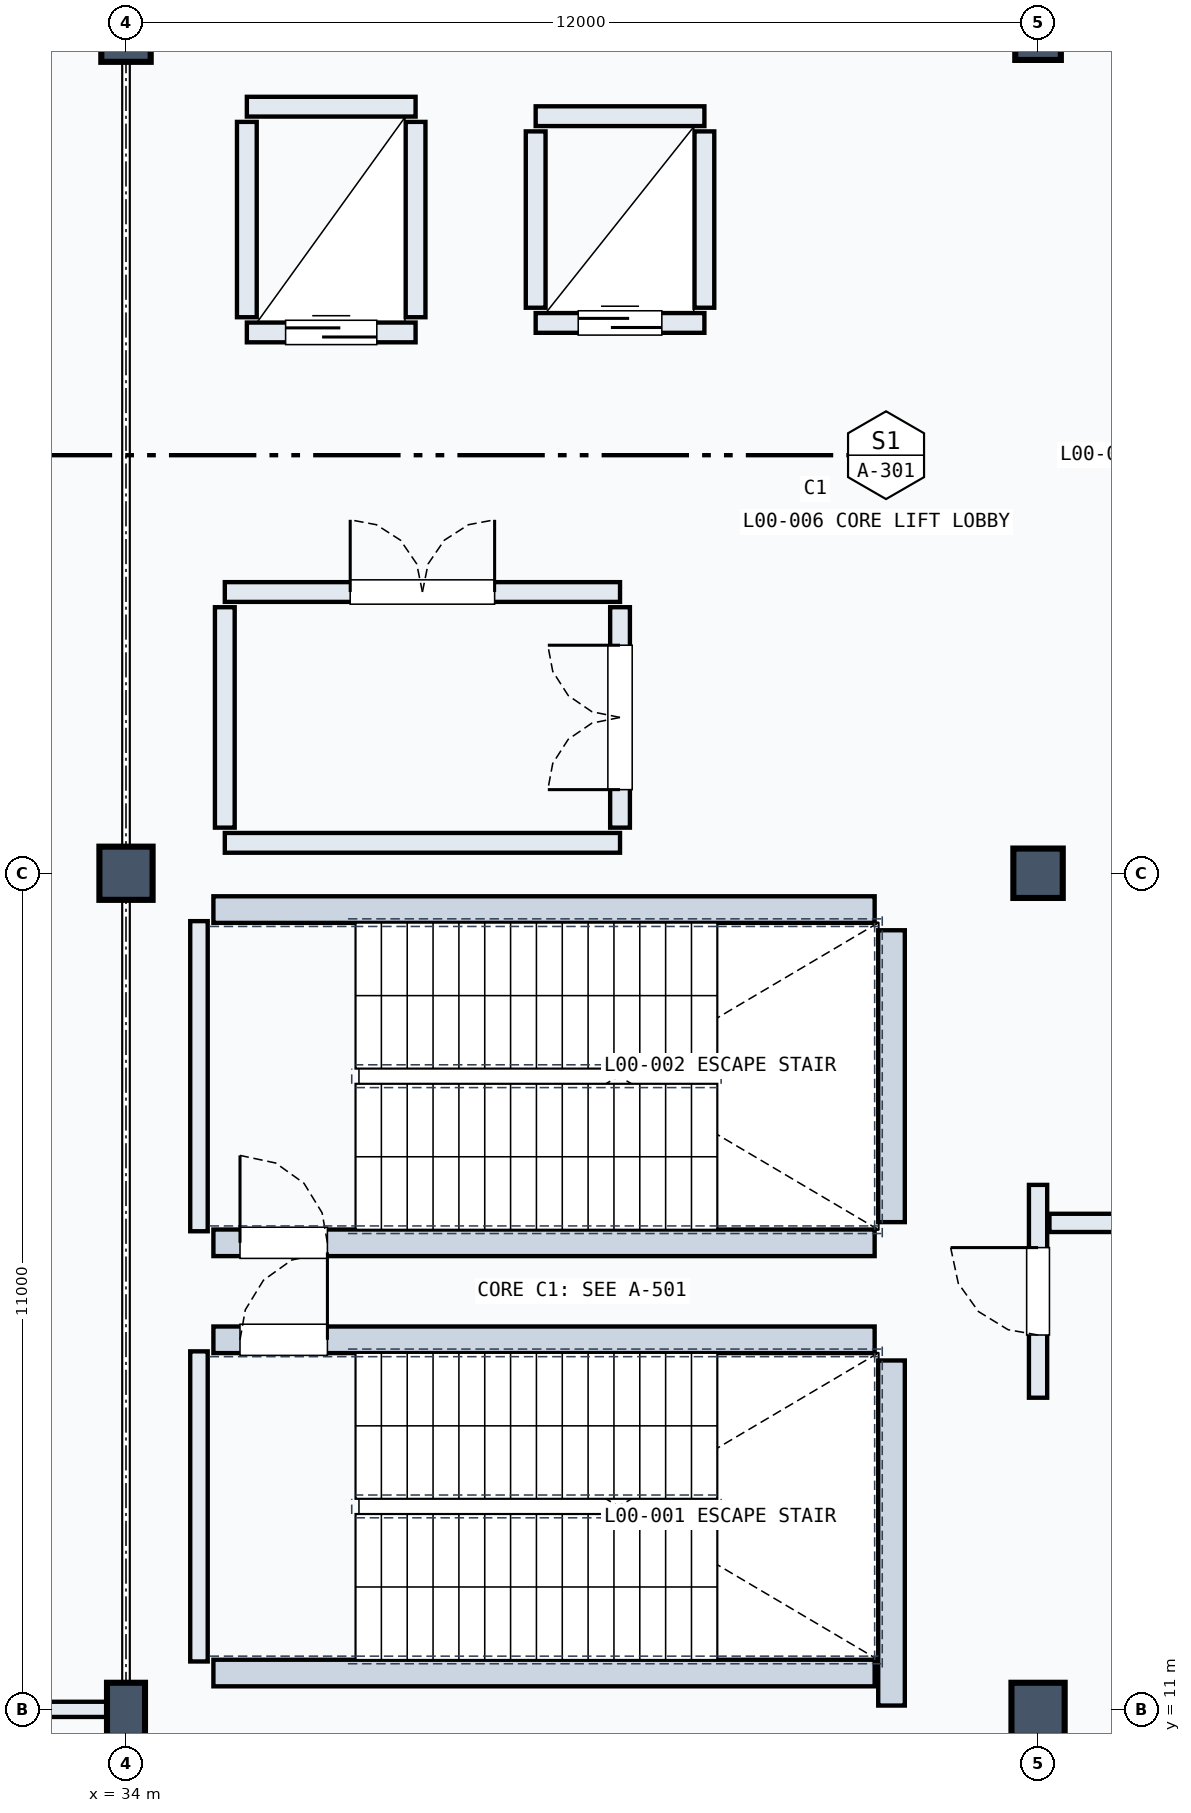
"""IFC4 building model, lengths in metres.
Left out: names, types, materials, properties, quantities, classifications, styles, units other than length and angle.
Written with IfcOpenShell. Run it as: python <this file> out.ifc"""

import sys

from ifc_helpers import new_model, si_unit, direction, frame, frame_2d, origin, origin_2d, place, context, subcontext, project, spatial, rectangle, extrude, element, fill, save


model = new_model("IFC4")
c1 = context("Model", 3, precision=1e-05, world=origin(), true_north=direction((0.0, 1.0)))
c2 = subcontext(c1, "Body", "Model", "MODEL_VIEW")
j1 = project(units=[si_unit("LENGTHUNIT", "METRE"), si_unit("PLANEANGLEUNIT", "RADIAN")], contexts=[c1])
p1 = place(None, origin())
s1 = spatial("IfcSite", under=j1, at=p1, CompositionType="ELEMENT")
p2 = place(p1, origin())
s2 = spatial("IfcBuilding", under=s1, at=p2, CompositionType="ELEMENT")
p3 = place(p2, origin())
s3 = spatial("IfcBuildingStorey", under=s2, at=p3, CompositionType="ELEMENT", Elevation=0.0)
p4 = place(p3, frame((34.0, 11.0, 0.0), z_axis=(0.0, 0.0, 1.0), x_axis=(1.0, 0.0, 0.0)))
e1 = element("IfcColumn", 1, at=p4, inside=s3, PredefinedType="COLUMN", context=c2, shape_type="SweptSolid", body=[
    extrude(rectangle(XDim=0.5, YDim=0.7, at=origin_2d()), origin(), (0.0, 0.0, 1.0), 5.4),
])
p5 = place(p3, frame((34.0, 22.0, 0.0), z_axis=(0.0, 0.0, 1.0), x_axis=(1.0, 0.0, 0.0)))
e2 = element("IfcColumn", 2, at=p5, inside=s3, PredefinedType="COLUMN", context=c2, shape_type="SweptSolid", body=[
    extrude(rectangle(XDim=0.7, YDim=0.7, at=origin_2d()), origin(), (0.0, 0.0, 1.0), 5.4),
])
p6 = place(p3, frame((34.0, 33.0, 0.0), z_axis=(0.0, 0.0, 1.0), x_axis=(1.0, 0.0, 0.0)))
e3 = element("IfcColumn", 3, at=p6, inside=s3, PredefinedType="COLUMN", context=c2, shape_type="SweptSolid", body=[
    extrude(rectangle(XDim=0.65, YDim=0.65, at=origin_2d()), origin(), (0.0, 0.0, 1.0), 5.4),
])
p7 = place(p3, frame((46.0, 11.0, 0.0), z_axis=(0.0, 0.0, 1.0), x_axis=(1.0, 0.0, 0.0)))
e4 = element("IfcColumn", 4, at=p7, inside=s3, PredefinedType="COLUMN", context=c2, shape_type="SweptSolid", body=[
    extrude(rectangle(XDim=0.7, YDim=0.7, at=origin_2d()), origin(), (0.0, 0.0, 1.0), 5.4),
])
p8 = place(p3, frame((46.0, 22.0, 0.0), z_axis=(0.0, 0.0, 1.0), x_axis=(1.0, 0.0, 0.0)))
e5 = element("IfcColumn", 5, at=p8, inside=s3, PredefinedType="COLUMN", context=c2, shape_type="SweptSolid", body=[
    extrude(rectangle(XDim=0.65, YDim=0.65, at=origin_2d()), origin(), (0.0, 0.0, 1.0), 5.4),
])
p9 = place(p3, frame((46.0, 33.0, 0.0), z_axis=(0.0, 0.0, 1.0), x_axis=(1.0, 0.0, 0.0)))
e6 = element("IfcColumn", 6, at=p9, inside=s3, PredefinedType="COLUMN", context=c2, shape_type="SweptSolid", body=[
    extrude(rectangle(XDim=0.6, YDim=0.6, at=origin_2d()), origin(), (0.0, 0.0, 1.0), 5.4),
])
p10 = place(p3, frame((34.96, 11.63, 0.0), z_axis=(0.0, 0.0, 1.0), x_axis=(0.0, 1.0, 0.0)))
e7 = element("IfcWall", 7, at=p10, inside=s3, PredefinedType="SOLIDWALL", context=c2, shape_type="SweptSolid", body=[
    extrude(rectangle(XDim=4.08, YDim=0.23, at=frame_2d((2.04, 0.0))), origin(), (0.0, 0.0, 1.0), 4.45),
])
p11 = place(p3, frame((44.072, 11.05, 0.0), z_axis=(0.0, 0.0, 1.0), x_axis=(0.0, 1.0, 0.0)))
e8 = element("IfcWall", 8, at=p11, inside=s3, PredefinedType="SOLIDWALL", context=c2, shape_type="SweptSolid", body=[
    extrude(rectangle(XDim=4.54, YDim=0.35, at=frame_2d((2.27, 0.0))), origin(), (0.0, 0.0, 1.0), 5.06),
])
p12 = place(p3, frame((35.15, 11.478, 0.0), z_axis=(0.0, 0.0, 1.0), x_axis=(1.0, 0.0, 0.0)))
e9 = element("IfcWall", 9, at=p12, inside=s3, PredefinedType="SOLIDWALL", context=c2, shape_type="SweptSolid", body=[
    extrude(rectangle(XDim=8.7, YDim=0.35, at=frame_2d((4.35, 0.0))), origin(), (0.0, 0.0, 1.0), 5.06),
])
p13 = place(p3, frame((35.15, 15.862, 0.0), z_axis=(0.0, 0.0, 1.0), x_axis=(1.0, 0.0, 0.0)))
e10 = element("IfcWall", 10, at=p13, inside=s3, PredefinedType="SOLIDWALL", context=c2, shape_type="SweptSolid", body=[
    extrude(rectangle(XDim=8.7, YDim=0.35, at=frame_2d((4.35, 0.0))), origin(), (0.0, 0.0, 1.0), 5.06),
])
p14 = place(p13, frame((0.35, 0.0, 0.0)))
e11 = element("IfcOpeningElement", 11, at=p14, cuts=e10, PredefinedType="OPENING", context=c2, shape_type="SweptSolid", body=[
    extrude(rectangle(XDim=1.15, YDim=2.2, at=frame_2d((0.575, 1.1))), frame((0.0, 0.185, 0.0), z_axis=(0.0, -1.0, 0.0), x_axis=(1.0, 0.0, 0.0)), (0.0, 0.0, 1.0), 0.37),
])
p15 = place(p3, frame((34.96, 17.29, 0.0), z_axis=(0.0, 0.0, 1.0), x_axis=(0.0, 1.0, 0.0)))
e12 = element("IfcWall", 12, at=p15, inside=s3, PredefinedType="SOLIDWALL", context=c2, shape_type="SweptSolid", body=[
    extrude(rectangle(XDim=4.08, YDim=0.23, at=frame_2d((2.04, 0.0))), origin(), (0.0, 0.0, 1.0), 4.45),
])
p16 = place(p3, frame((44.072, 17.41, 0.0), z_axis=(0.0, 0.0, 1.0), x_axis=(0.0, 1.0, 0.0)))
e13 = element("IfcWall", 13, at=p16, inside=s3, PredefinedType="SOLIDWALL", context=c2, shape_type="SweptSolid", body=[
    extrude(rectangle(XDim=3.84, YDim=0.35, at=frame_2d((1.92, 0.0))), origin(), (0.0, 0.0, 1.0), 5.06),
])
p17 = place(p3, frame((35.15, 17.138, 0.0), z_axis=(0.0, 0.0, 1.0), x_axis=(1.0, 0.0, 0.0)))
e14 = element("IfcWall", 14, at=p17, inside=s3, PredefinedType="SOLIDWALL", context=c2, shape_type="SweptSolid", body=[
    extrude(rectangle(XDim=8.7, YDim=0.35, at=frame_2d((4.35, 0.0))), origin(), (0.0, 0.0, 1.0), 5.06),
])
p18 = place(p17, frame((0.35, 0.0, 0.0)))
e15 = element("IfcOpeningElement", 15, at=p18, cuts=e14, PredefinedType="OPENING", context=c2, shape_type="SweptSolid", body=[
    extrude(rectangle(XDim=1.15, YDim=2.2, at=frame_2d((0.575, 1.1))), frame((0.0, 0.185, 0.0), z_axis=(0.0, -1.0, 0.0), x_axis=(1.0, 0.0, 0.0)), (0.0, 0.0, 1.0), 0.37),
])
p19 = place(p3, frame((35.15, 21.522, 0.0), z_axis=(0.0, 0.0, 1.0), x_axis=(1.0, 0.0, 0.0)))
e16 = element("IfcWall", 16, at=p19, inside=s3, PredefinedType="SOLIDWALL", context=c2, shape_type="SweptSolid", body=[
    extrude(rectangle(XDim=8.7, YDim=0.35, at=frame_2d((4.35, 0.0))), origin(), (0.0, 0.0, 1.0), 5.06),
])
p20 = place(p3, frame((35.59, 29.115, 0.0), z_axis=(0.0, 0.0, 1.0), x_axis=(1.0, 0.0, 0.0)))
e17 = element("IfcWall", 17, at=p20, inside=s3, PredefinedType="SOLIDWALL", context=c2, shape_type="SweptSolid", body=[
    extrude(rectangle(XDim=2.22, YDim=0.26, at=frame_2d((1.11, 0.0))), origin(), (0.0, 0.0, 1.0), 5.06),
])
p21 = place(p20, frame((0.51, 0.0, 0.0)))
e18 = element("IfcOpeningElement", 18, at=p21, cuts=e17, PredefinedType="OPENING", context=c2, shape_type="SweptSolid", body=[
    extrude(rectangle(XDim=1.2, YDim=2.2, at=frame_2d((0.6, 1.1))), frame((0.0, 0.14, 0.0), z_axis=(0.0, -1.0, 0.0), x_axis=(1.0, 0.0, 0.0)), (0.0, 0.0, 1.0), 0.28),
])
p22 = place(p3, frame((35.59, 32.085, 0.0), z_axis=(0.0, 0.0, 1.0), x_axis=(1.0, 0.0, 0.0)))
e19 = element("IfcWall", 19, at=p22, inside=s3, PredefinedType="SOLIDWALL", context=c2, shape_type="SweptSolid", body=[
    extrude(rectangle(XDim=2.22, YDim=0.26, at=frame_2d((1.11, 0.0))), origin(), (0.0, 0.0, 1.0), 5.06),
])
for number, where, z_axis, x_axis in (
    (20, (35.59, 29.315, 0.0), (0.0, 0.0, 1.0), (0.0, 1.0, 0.0)),
    (21, (37.81, 29.315, 0.0), (0.0, 0.0, 1.0), (0.0, 1.0, 0.0)),
):
    element("IfcWall", number, at=place(p3, frame(where, z_axis=z_axis, x_axis=x_axis)), inside=s3, PredefinedType="SOLIDWALL", context=c2, shape_type="SweptSolid", body=[
        extrude(rectangle(XDim=2.57, YDim=0.26, at=frame_2d((1.285, 0.0))), origin(), (0.0, 0.0, 1.0), 5.06),
    ])
p23 = place(p3, frame((39.39, 29.24, 0.0), z_axis=(0.0, 0.0, 1.0), x_axis=(1.0, 0.0, 0.0)))
e22 = element("IfcWall", 22, at=p23, inside=s3, PredefinedType="SOLIDWALL", context=c2, shape_type="SweptSolid", body=[
    extrude(rectangle(XDim=2.22, YDim=0.26, at=frame_2d((1.11, 0.0))), origin(), (0.0, 0.0, 1.0), 5.06),
])
p24 = place(p23, frame((0.56, 0.0, 0.0)))
e23 = element("IfcOpeningElement", 23, at=p24, cuts=e22, PredefinedType="OPENING", context=c2, shape_type="SweptSolid", body=[
    extrude(rectangle(XDim=1.1, YDim=2.15, at=frame_2d((0.55, 1.075))), frame((0.0, 0.14, 0.0), z_axis=(0.0, -1.0, 0.0), x_axis=(1.0, 0.0, 0.0)), (0.0, 0.0, 1.0), 0.28),
])
p25 = place(p3, frame((39.39, 31.96, 0.0), z_axis=(0.0, 0.0, 1.0), x_axis=(1.0, 0.0, 0.0)))
e24 = element("IfcWall", 24, at=p25, inside=s3, PredefinedType="SOLIDWALL", context=c2, shape_type="SweptSolid", body=[
    extrude(rectangle(XDim=2.22, YDim=0.26, at=frame_2d((1.11, 0.0))), origin(), (0.0, 0.0, 1.0), 5.06),
])
for number, where, z_axis, x_axis in (
    (25, (39.39, 29.44, 0.0), (0.0, 0.0, 1.0), (0.0, 1.0, 0.0)),
    (26, (41.61, 29.44, 0.0), (0.0, 0.0, 1.0), (0.0, 1.0, 0.0)),
):
    element("IfcWall", number, at=place(p3, frame(where, z_axis=z_axis, x_axis=x_axis)), inside=s3, PredefinedType="SOLIDWALL", context=c2, shape_type="SweptSolid", body=[
        extrude(rectangle(XDim=2.32, YDim=0.26, at=frame_2d((1.16, 0.0))), origin(), (0.0, 0.0, 1.0), 5.06),
    ])
p26 = place(p3, frame((35.3, 25.7, 0.0), z_axis=(0.0, 0.0, 1.0), x_axis=(1.0, 0.0, 0.0)))
e27 = element("IfcWall", 27, at=p26, inside=s3, PredefinedType="SOLIDWALL", context=c2, shape_type="SweptSolid", body=[
    extrude(rectangle(XDim=5.2, YDim=0.26, at=frame_2d((2.6, 0.0))), origin(), (0.0, 0.0, 1.0), 5.06),
])
p27 = place(p26, frame((1.65, 0.0, 0.0)))
e28 = element("IfcOpeningElement", 28, at=p27, cuts=e27, PredefinedType="OPENING", context=c2, shape_type="SweptSolid", body=[
    extrude(rectangle(XDim=1.9, YDim=2.2, at=frame_2d((0.95, 1.1))), frame((0.0, 0.14, 0.0), z_axis=(0.0, -1.0, 0.0), x_axis=(1.0, 0.0, 0.0)), (0.0, 0.0, 1.0), 0.28),
])
p28 = place(p3, frame((35.3, 22.4, 0.0), z_axis=(0.0, 0.0, 1.0), x_axis=(1.0, 0.0, 0.0)))
e29 = element("IfcWall", 29, at=p28, inside=s3, PredefinedType="SOLIDWALL", context=c2, shape_type="SweptSolid", body=[
    extrude(rectangle(XDim=5.2, YDim=0.26, at=frame_2d((2.6, 0.0))), origin(), (0.0, 0.0, 1.0), 4.438),
])
p29 = place(p3, frame((35.3, 22.6, 0.0), z_axis=(0.0, 0.0, 1.0), x_axis=(0.0, 1.0, 0.0)))
e30 = element("IfcWall", 30, at=p29, inside=s3, PredefinedType="SOLIDWALL", context=c2, shape_type="SweptSolid", body=[
    extrude(rectangle(XDim=2.9, YDim=0.26, at=frame_2d((1.45, 0.0))), origin(), (0.0, 0.0, 1.0), 5.06),
])
p30 = place(p3, frame((40.5, 22.6, 0.0), z_axis=(0.0, 0.0, 1.0), x_axis=(0.0, 1.0, 0.0)))
e31 = element("IfcWall", 31, at=p30, inside=s3, PredefinedType="SOLIDWALL", context=c2, shape_type="SweptSolid", body=[
    extrude(rectangle(XDim=2.9, YDim=0.26, at=frame_2d((1.45, 0.0))), origin(), (0.0, 0.0, 1.0), 5.06),
])
p31 = place(p30, frame((0.5, 0.0, 0.0)))
e32 = element("IfcOpeningElement", 32, at=p31, cuts=e31, PredefinedType="OPENING", context=c2, shape_type="SweptSolid", body=[
    extrude(rectangle(XDim=1.9, YDim=2.2, at=frame_2d((0.95, 1.1))), frame((0.0, 0.14, 0.0), z_axis=(0.0, -1.0, 0.0), x_axis=(1.0, 0.0, 0.0)), (0.0, 0.0, 1.0), 0.28),
])
p32 = place(p3, frame((28.0, 11.0, 0.0), z_axis=(0.0, 0.0, 1.0), x_axis=(1.0, 0.0, 0.0)))
e33 = element("IfcWall", 33, at=p32, inside=s3, PredefinedType="PARTITIONING", context=c2, shape_type="SweptSolid", body=[
    extrude(rectangle(XDim=5.78, YDim=0.2, at=frame_2d((2.89, 0.0))), origin(), (0.0, 0.0, 1.0), 4.366),
])
p33 = place(p32, frame((2.42, 0.0, 0.0)))
e34 = element("IfcOpeningElement", 34, at=p33, cuts=e33, PredefinedType="OPENING", context=c2, shape_type="SweptSolid", body=[
    extrude(rectangle(XDim=0.94, YDim=2.15, at=frame_2d((0.47, 1.075))), frame((0.0, 0.11, 0.0), z_axis=(0.0, -1.0, 0.0), x_axis=(1.0, 0.0, 0.0)), (0.0, 0.0, 1.0), 0.22),
])
p34 = place(p3, frame((46.0, 2.4, 0.0), z_axis=(0.0, 0.0, 1.0), x_axis=(0.0, 1.0, 0.0)))
e35 = element("IfcWall", 35, at=p34, inside=s3, PredefinedType="PARTITIONING", context=c2, shape_type="SweptSolid", body=[
    extrude(rectangle(XDim=8.38, YDim=0.14, at=frame_2d((4.19, 0.0))), origin(), (0.0, 0.0, 1.0), 4.1),
])
p35 = place(p34, frame((3.52, 0.0, 0.0)))
e36 = element("IfcOpeningElement", 36, at=p35, cuts=e35, PredefinedType="OPENING", context=c2, shape_type="SweptSolid", body=[
    extrude(rectangle(XDim=1.34, YDim=2.15, at=frame_2d((0.67, 1.075))), frame((0.0, 0.08, 0.0), z_axis=(0.0, -1.0, 0.0), x_axis=(1.0, 0.0, 0.0)), (0.0, 0.0, 1.0), 0.16),
])
p36 = place(p3, frame((34.0, 2.4, 0.0), z_axis=(0.0, 0.0, 1.0), x_axis=(0.0, 1.0, 0.0)))
e37 = element("IfcWall", 37, at=p36, inside=s3, PredefinedType="PARTITIONING", context=c2, shape_type="SweptSolid", body=[
    extrude(rectangle(XDim=8.38, YDim=0.24, at=frame_2d((4.19, 0.0))), origin(), (0.0, 0.0, 1.0), 4.366),
])
p37 = place(p3, frame((46.15, 17.4, 0.0), z_axis=(0.0, 0.0, 1.0), x_axis=(1.0, 0.0, 0.0)))
e38 = element("IfcWall", 38, at=p37, inside=s3, PredefinedType="PARTITIONING", context=c2, shape_type="SweptSolid", body=[
    extrude(rectangle(XDim=5.05, YDim=0.24, at=frame_2d((2.525, 0.0))), origin(), (0.0, 0.0, 1.0), 4.25),
])
p38 = place(p3, frame((46.0, 15.1, 0.0), z_axis=(0.0, 0.0, 1.0), x_axis=(0.0, 1.0, 0.0)))
e39 = element("IfcWall", 39, at=p38, inside=s3, PredefinedType="PARTITIONING", context=c2, shape_type="SweptSolid", body=[
    extrude(rectangle(XDim=2.8, YDim=0.24, at=frame_2d((1.4, 0.0))), origin(), (0.0, 0.0, 1.0), 4.25),
])
p39 = place(p38, frame((0.825, 0.0, 0.0)))
e40 = element("IfcOpeningElement", 40, at=p39, cuts=e39, PredefinedType="OPENING", context=c2, shape_type="SweptSolid", body=[
    extrude(rectangle(XDim=1.15, YDim=2.2, at=frame_2d((0.575, 1.1))), frame((0.0, 0.13, 0.0), z_axis=(0.0, -1.0, 0.0), x_axis=(1.0, 0.0, 0.0)), (0.0, 0.0, 1.0), 0.26),
])
p40 = place(p14, origin())
e41 = element("IfcDoor", 41, at=p40, inside=s3, OperationType="SINGLE_SWING_RIGHT", PredefinedType="DOOR", context=c2, shape_type="SweptSolid", body=[
    extrude(rectangle(XDim=1.15, YDim=2.2, at=frame_2d((0.575, 1.1))), frame((0.0, 0.025, 0.0), z_axis=(0.0, -1.0, 0.0), x_axis=(1.0, 0.0, 0.0)), (0.0, 0.0, 1.0), 0.05),
])
fill(e11, e41)
p41 = place(p18, origin())
e42 = element("IfcDoor", 42, at=p41, inside=s3, OperationType="SINGLE_SWING_LEFT", PredefinedType="DOOR", context=c2, shape_type="SweptSolid", body=[
    extrude(rectangle(XDim=1.15, YDim=2.2, at=frame_2d((0.575, 1.1))), frame((0.0, 0.025, 0.0), z_axis=(0.0, -1.0, 0.0), x_axis=(1.0, 0.0, 0.0)), (0.0, 0.0, 1.0), 0.05),
])
fill(e15, e42)
p42 = place(p21, origin())
e43 = element("IfcDoor", 43, at=p42, inside=s3, OperationType="SLIDING_TO_LEFT", PredefinedType="DOOR", context=c2, shape_type="SweptSolid", body=[
    extrude(rectangle(XDim=1.2, YDim=2.2, at=frame_2d((0.6, 1.1))), frame((0.0, 0.025, 0.0), z_axis=(0.0, -1.0, 0.0), x_axis=(1.0, 0.0, 0.0)), (0.0, 0.0, 1.0), 0.05),
])
fill(e18, e43)
p43 = place(p24, origin())
e44 = element("IfcDoor", 44, at=p43, inside=s3, OperationType="SLIDING_TO_LEFT", PredefinedType="DOOR", context=c2, shape_type="SweptSolid", body=[
    extrude(rectangle(XDim=1.1, YDim=2.15, at=frame_2d((0.55, 1.075))), frame((0.0, 0.025, 0.0), z_axis=(0.0, -1.0, 0.0), x_axis=(1.0, 0.0, 0.0)), (0.0, 0.0, 1.0), 0.05),
])
fill(e23, e44)
p44 = place(p27, origin())
e45 = element("IfcDoor", 45, at=p44, inside=s3, OperationType="DOUBLE_DOOR_SINGLE_SWING", PredefinedType="DOOR", context=c2, shape_type="SweptSolid", body=[
    extrude(rectangle(XDim=1.9, YDim=2.2, at=frame_2d((0.95, 1.1))), frame((0.0, 0.025, 0.0), z_axis=(0.0, -1.0, 0.0), x_axis=(1.0, 0.0, 0.0)), (0.0, 0.0, 1.0), 0.05),
])
fill(e28, e45)
p45 = place(p31, origin())
e46 = element("IfcDoor", 46, at=p45, inside=s3, OperationType="DOUBLE_DOOR_SINGLE_SWING", PredefinedType="DOOR", context=c2, shape_type="SweptSolid", body=[
    extrude(rectangle(XDim=1.9, YDim=2.2, at=frame_2d((0.95, 1.1))), frame((0.0, 0.025, 0.0), z_axis=(0.0, -1.0, 0.0), x_axis=(1.0, 0.0, 0.0)), (0.0, 0.0, 1.0), 0.05),
])
fill(e32, e46)
p46 = place(p39, origin())
e47 = element("IfcDoor", 47, at=p46, inside=s3, OperationType="SINGLE_SWING_RIGHT", PredefinedType="DOOR", context=c2, shape_type="SweptSolid", body=[
    extrude(rectangle(XDim=1.15, YDim=2.2, at=frame_2d((0.575, 1.1))), frame((0.0, 0.025, 0.0), z_axis=(0.0, -1.0, 0.0), x_axis=(1.0, 0.0, 0.0)), (0.0, 0.0, 1.0), 0.05),
])
fill(e40, e47)
save(model, sys.argv[1])
